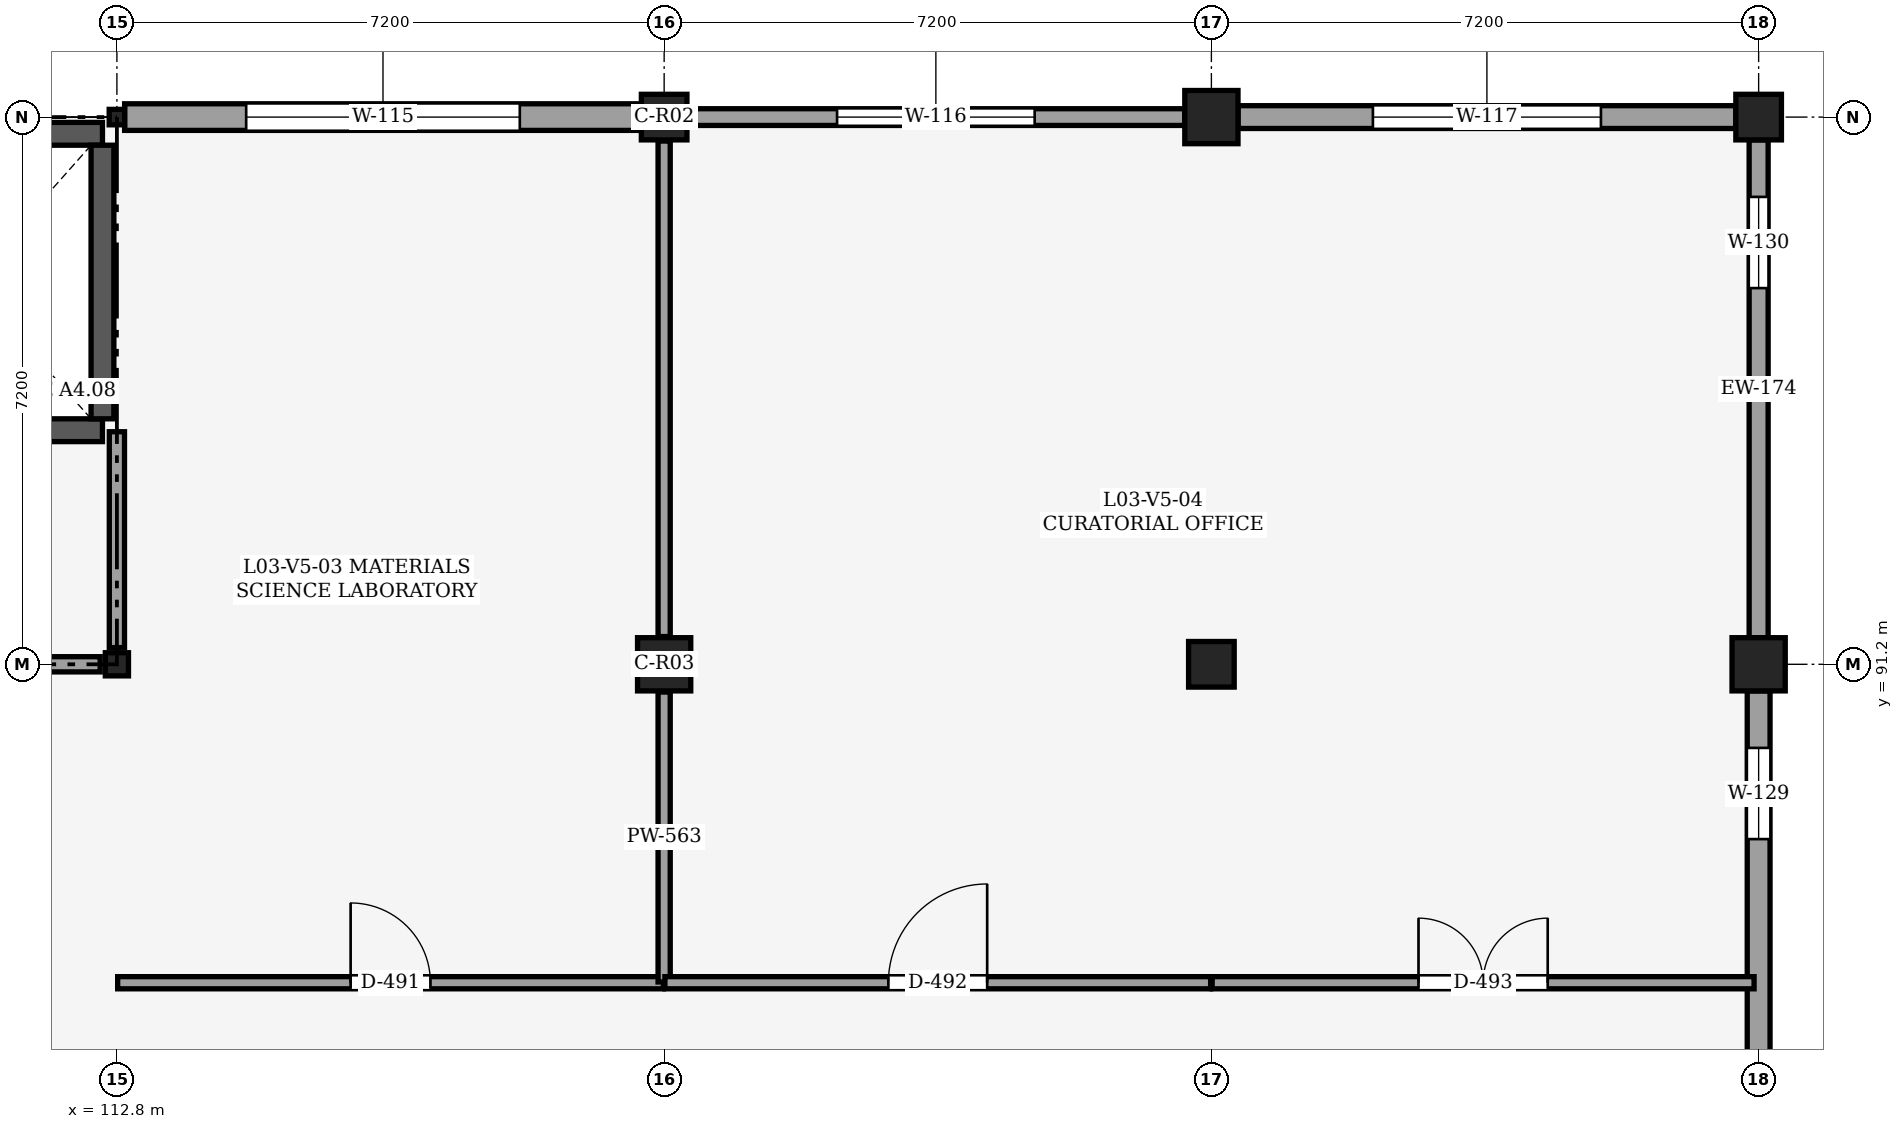
"""IFC4 building model, lengths in metres.
Left out: names, types, materials, properties, quantities, classifications, styles, units other than length and angle.
Written with IfcOpenShell. Run it as: python <this file> out.ifc"""

import sys

from ifc_helpers import new_model, si_unit, direction, frame, frame_2d, origin, origin_2d, place, context, subcontext, project, spatial, rectangle, hollow_rectangle, extrude, element, fill, save


model = new_model("IFC4")
c1 = context("Model", 3, precision=1e-05, world=origin(), true_north=direction((0.0, 1.0)))
c2 = subcontext(c1, "Body", "Model", "MODEL_VIEW")
j1 = project(units=[si_unit("LENGTHUNIT", "METRE"), si_unit("PLANEANGLEUNIT", "RADIAN")], contexts=[c1])
p1 = place(None, origin())
s1 = spatial("IfcSite", under=j1, at=p1, CompositionType="ELEMENT")
p2 = place(p1, origin())
s2 = spatial("IfcBuilding", under=s1, at=p2, CompositionType="ELEMENT")
p3 = place(p2, frame((0.0, 0.0, 15.0)))
s3 = spatial("IfcBuildingStorey", under=s2, at=p3, CompositionType="ELEMENT", Elevation=15.0)
p4 = place(p3, frame((112.8, 91.2, 0.0), z_axis=(0.0, 0.0, 1.0), x_axis=(1.0, 0.0, 0.0)))
e1 = element("IfcColumn", 1, at=p4, inside=s3, PredefinedType="COLUMN", context=c2, shape_type="SweptSolid", body=[
    extrude(hollow_rectangle(XDim=0.305, YDim=0.305, WallThickness=0.016, OuterFilletRadius=0.032, at=origin_2d()), origin(), (0.0, 0.0, 1.0), 4.8),
])
p5 = place(p3, frame((112.8, 98.4, 0.0), z_axis=(0.0, 0.0, 1.0), x_axis=(1.0, 0.0, 0.0)))
e2 = element("IfcColumn", 2, at=p5, inside=s3, PredefinedType="COLUMN", context=c2, shape_type="SweptSolid", body=[
    extrude(hollow_rectangle(XDim=0.203, YDim=0.203, WallThickness=0.013, OuterFilletRadius=0.025, at=origin_2d()), origin(), (0.0, 0.0, 1.0), 4.8),
])
p6 = place(p3, frame((120.0, 91.2, 0.0), z_axis=(0.0, 0.0, 1.0), x_axis=(1.0, 0.0, 0.0)))
e3 = element("IfcColumn", 3, at=p6, inside=s3, PredefinedType="COLUMN", context=c2, shape_type="SweptSolid", body=[
    extrude(rectangle(XDim=0.7, YDim=0.7, at=origin_2d()), origin(), (0.0, 0.0, 1.0), 4.8),
])
for number, where, z_axis, x_axis in (
    (4, (120.0, 98.4, 0.0), (0.0, 0.0, 1.0), (1.0, 0.0, 0.0)),
    (5, (127.2, 91.2, 0.0), (0.0, 0.0, 1.0), (1.0, 0.0, 0.0)),
):
    element("IfcColumn", number, at=place(p3, frame(where, z_axis=z_axis, x_axis=x_axis)), inside=s3, PredefinedType="COLUMN", context=c2, shape_type="SweptSolid", body=[
        extrude(rectangle(XDim=0.6, YDim=0.6, at=origin_2d()), origin(), (0.0, 0.0, 1.0), 4.8),
    ])
for number, where, z_axis, x_axis in (
    (6, (127.2, 98.4, 0.0), (0.0, 0.0, 1.0), (1.0, 0.0, 0.0)),
    (7, (134.4, 91.2, 0.0), (0.0, 0.0, 1.0), (1.0, 0.0, 0.0)),
):
    element("IfcColumn", number, at=place(p3, frame(where, z_axis=z_axis, x_axis=x_axis)), inside=s3, PredefinedType="COLUMN", context=c2, shape_type="SweptSolid", body=[
        extrude(rectangle(XDim=0.7, YDim=0.7, at=origin_2d()), origin(), (0.0, 0.0, 1.0), 4.8),
    ])
p7 = place(p3, frame((134.4, 98.4, 0.0), z_axis=(0.0, 0.0, 1.0), x_axis=(1.0, 0.0, 0.0)))
e8 = element("IfcColumn", 8, at=p7, inside=s3, PredefinedType="COLUMN", context=c2, shape_type="SweptSolid", body=[
    extrude(rectangle(XDim=0.6, YDim=0.6, at=origin_2d()), origin(), (0.0, 0.0, 1.0), 4.8),
])
p8 = place(p3, frame((112.902, 98.4, 0.0), z_axis=(0.0, 0.0, 1.0), x_axis=(1.0, 0.0, 0.0)))
e9 = element("IfcWall", 9, at=p8, inside=s3, PredefinedType="SOLIDWALL", context=c2, shape_type="SweptSolid", body=[
    extrude(rectangle(XDim=6.798, YDim=0.35, at=frame_2d((3.399, 0.0))), origin(), (0.0, 0.0, 1.0), 3.913),
])
p9 = place(p8, frame((1.599, 0.0, 0.9)))
e10 = element("IfcOpeningElement", 10, at=p9, cuts=e9, PredefinedType="OPENING", context=c2, shape_type="SweptSolid", body=[
    extrude(rectangle(XDim=3.6, YDim=1.05, at=frame_2d((1.8, 0.525))), frame((0.0, 0.185, 0.0), z_axis=(0.0, -1.0, 0.0), x_axis=(1.0, 0.0, 0.0)), (0.0, 0.0, 1.0), 0.371),
])
p10 = place(p3, frame((120.3, 98.4, 0.0), z_axis=(0.0, 0.0, 1.0), x_axis=(1.0, 0.0, 0.0)))
e11 = element("IfcWall", 11, at=p10, inside=s3, PredefinedType="SOLIDWALL", context=c2, shape_type="SweptSolid", body=[
    extrude(rectangle(XDim=6.55, YDim=0.22, at=frame_2d((3.275, 0.0))), origin(), (0.0, 0.0, 1.0), 4.164),
])
p11 = place(p10, frame((1.975, 0.0, 0.85)))
e12 = element("IfcOpeningElement", 12, at=p11, cuts=e11, PredefinedType="OPENING", context=c2, shape_type="SweptSolid", body=[
    extrude(rectangle(XDim=2.6, YDim=1.9, at=frame_2d((1.3, 0.95))), frame((0.0, 0.12, 0.0), z_axis=(0.0, -1.0, 0.0), x_axis=(1.0, 0.0, 0.0)), (0.0, 0.0, 1.0), 0.24),
])
p12 = place(p3, frame((127.55, 98.4, 0.0), z_axis=(0.0, 0.0, 1.0), x_axis=(1.0, 0.0, 0.0)))
e13 = element("IfcWall", 13, at=p12, inside=s3, PredefinedType="SOLIDWALL", context=c2, shape_type="SweptSolid", body=[
    extrude(rectangle(XDim=6.55, YDim=0.3, at=frame_2d((3.275, 0.0))), origin(), (0.0, 0.0, 1.0), 3.987),
])
p13 = place(p12, frame((1.775, 0.0, 0.85)))
e14 = element("IfcOpeningElement", 14, at=p13, cuts=e13, PredefinedType="OPENING", context=c2, shape_type="SweptSolid", body=[
    extrude(rectangle(XDim=3.0, YDim=1.9, at=frame_2d((1.5, 0.95))), frame((0.0, 0.16, 0.0), z_axis=(0.0, -1.0, 0.0), x_axis=(1.0, 0.0, 0.0)), (0.0, 0.0, 1.0), 0.321),
])
p14 = place(p3, frame((134.4, 90.85, 0.0), z_axis=(0.0, 0.0, 1.0), x_axis=(0.0, -1.0, 0.0)))
e15 = element("IfcWall", 15, at=p14, inside=s3, PredefinedType="SOLIDWALL", context=c2, shape_type="SweptSolid", body=[
    extrude(rectangle(XDim=6.55, YDim=0.3, at=frame_2d((3.275, 0.0))), origin(), (0.0, 0.0, 1.0), 4.54),
])
p15 = place(p14, frame((0.75, 0.0, 0.9)))
e16 = element("IfcOpeningElement", 16, at=p15, cuts=e15, PredefinedType="OPENING", context=c2, shape_type="SweptSolid", body=[
    extrude(rectangle(XDim=1.2, YDim=1.5, at=frame_2d((0.6, 0.75))), frame((0.0, 0.16, 0.0), z_axis=(0.0, -1.0, 0.0), x_axis=(1.0, 0.0, 0.0)), (0.0, 0.0, 1.0), 0.321),
])
p16 = place(p3, frame((134.4, 98.1, 0.0), z_axis=(0.0, 0.0, 1.0), x_axis=(0.0, -1.0, 0.0)))
e17 = element("IfcWall", 17, at=p16, inside=s3, PredefinedType="SOLIDWALL", context=c2, shape_type="SweptSolid", body=[
    extrude(rectangle(XDim=6.55, YDim=0.25, at=frame_2d((3.275, 0.0))), origin(), (0.0, 0.0, 1.0), 3.987),
])
p17 = place(p16, frame((0.75, 0.0, 0.9)))
e18 = element("IfcOpeningElement", 18, at=p17, cuts=e17, PredefinedType="OPENING", context=c2, shape_type="SweptSolid", body=[
    extrude(rectangle(XDim=1.2, YDim=1.5, at=frame_2d((0.6, 0.75))), frame((0.0, 0.135, 0.0), z_axis=(0.0, -1.0, 0.0), x_axis=(1.0, 0.0, 0.0)), (0.0, 0.0, 1.0), 0.271),
])
p18 = place(p3, frame((104.59, 94.28, 0.0), z_axis=(0.0, 0.0, 1.0), x_axis=(1.0, 0.0, 0.0)))
e19 = element("IfcWall", 19, at=p18, inside=s3, PredefinedType="SHEAR", context=c2, shape_type="SweptSolid", body=[
    extrude(rectangle(XDim=8.02, YDim=0.3, at=frame_2d((4.01, 0.0))), origin(), (0.0, 0.0, 1.0), 4.54),
])
p19 = place(p18, frame((0.45, 0.0, 0.0)))
e20 = element("IfcOpeningElement", 20, at=p19, cuts=e19, PredefinedType="OPENING", context=c2, shape_type="SweptSolid", body=[
    extrude(rectangle(XDim=1.1, YDim=2.15, at=frame_2d((0.55, 1.075))), frame((0.0, 0.16, 0.0), z_axis=(0.0, -1.0, 0.0), x_axis=(1.0, 0.0, 0.0)), (0.0, 0.0, 1.0), 0.321),
])
p20 = place(p3, frame((104.59, 98.18, 0.0), z_axis=(0.0, 0.0, 1.0), x_axis=(1.0, 0.0, 0.0)))
e21 = element("IfcWall", 21, at=p20, inside=s3, PredefinedType="SHEAR", context=c2, shape_type="SweptSolid", body=[
    extrude(rectangle(XDim=8.02, YDim=0.3, at=frame_2d((4.01, 0.0))), origin(), (0.0, 0.0, 1.0), 4.54),
])
p21 = place(p3, frame((112.61, 94.43, 0.0), z_axis=(0.0, 0.0, 1.0), x_axis=(0.0, 1.0, 0.0)))
e22 = element("IfcWall", 22, at=p21, inside=s3, PredefinedType="SHEAR", context=c2, shape_type="SweptSolid", body=[
    extrude(rectangle(XDim=3.6, YDim=0.3, at=frame_2d((1.8, 0.0))), origin(), (0.0, 0.0, 1.0), 4.54),
])
p22 = place(p3, frame((112.8, 91.42, 0.0), z_axis=(0.0, 0.0, 1.0), x_axis=(0.0, 1.0, 0.0)))
e23 = element("IfcWall", 23, at=p22, inside=s3, PredefinedType="PARTITIONING", context=c2, shape_type="SweptSolid", body=[
    extrude(rectangle(XDim=2.84, YDim=0.2, at=frame_2d((1.42, 0.0))), origin(), (0.0, 0.0, 1.0), 4.058),
])
p23 = place(p3, frame((104.62, 91.2, 0.0), z_axis=(0.0, 0.0, 1.0), x_axis=(1.0, 0.0, 0.0)))
e24 = element("IfcWall", 24, at=p23, inside=s3, PredefinedType="PARTITIONING", context=c2, shape_type="SweptSolid", body=[
    extrude(rectangle(XDim=7.96, YDim=0.2, at=frame_2d((3.98, 0.0))), origin(), (0.0, 0.0, 1.0), 3.908),
])
p24 = place(p23, frame((3.255, 0.0, 0.0)))
e25 = element("IfcOpeningElement", 25, at=p24, cuts=e24, PredefinedType="OPENING", context=c2, shape_type="SweptSolid", body=[
    extrude(rectangle(XDim=1.45, YDim=2.2, at=frame_2d((0.725, 1.1))), frame((0.0, 0.11, 0.0), z_axis=(0.0, -1.0, 0.0), x_axis=(1.0, 0.0, 0.0)), (0.0, 0.0, 1.0), 0.22),
])
p25 = place(p3, frame((112.81, 87.01, 0.0), z_axis=(0.0, 0.0, 1.0), x_axis=(1.0, 0.0, 0.0)))
e26 = element("IfcWall", 26, at=p25, inside=s3, PredefinedType="PARTITIONING", context=c2, shape_type="SweptSolid", body=[
    extrude(rectangle(XDim=7.18, YDim=0.16, at=frame_2d((3.59, 0.0))), origin(), (0.0, 0.0, 1.0), 4.52),
])
p26 = place(p25, frame((3.065, 0.0, 0.0)))
e27 = element("IfcOpeningElement", 27, at=p26, cuts=e26, PredefinedType="OPENING", context=c2, shape_type="SweptSolid", body=[
    extrude(rectangle(XDim=1.05, YDim=2.15, at=frame_2d((0.525, 1.075))), frame((0.0, 0.09, 0.0), z_axis=(0.0, -1.0, 0.0), x_axis=(1.0, 0.0, 0.0)), (0.0, 0.0, 1.0), 0.18),
])
p27 = place(p3, frame((120.0, 87.02, 0.0), z_axis=(0.0, 0.0, 1.0), x_axis=(0.0, 1.0, 0.0)))
e28 = element("IfcWall", 28, at=p27, inside=s3, PredefinedType="PARTITIONING", context=c2, shape_type="SweptSolid", body=[
    extrude(rectangle(XDim=3.815, YDim=0.16, at=frame_2d((1.907, 0.0))), origin(), (0.0, 0.0, 1.0), 4.52),
])
p28 = place(p3, frame((120.0, 91.565, 0.0), z_axis=(0.0, 0.0, 1.0), x_axis=(0.0, 1.0, 0.0)))
e29 = element("IfcWall", 29, at=p28, inside=s3, PredefinedType="PARTITIONING", context=c2, shape_type="SweptSolid", body=[
    extrude(rectangle(XDim=6.52, YDim=0.16, at=frame_2d((3.26, 0.0))), origin(), (0.0, 0.0, 1.0), 3.908),
])
p29 = place(p3, frame((120.01, 87.01, 0.0), z_axis=(0.0, 0.0, 1.0), x_axis=(1.0, 0.0, 0.0)))
e30 = element("IfcWall", 30, at=p29, inside=s3, PredefinedType="PARTITIONING", context=c2, shape_type="SweptSolid", body=[
    extrude(rectangle(XDim=7.18, YDim=0.16, at=frame_2d((3.59, 0.0))), origin(), (0.0, 0.0, 1.0), 4.52),
])
p30 = place(p29, frame((2.94, 0.0, 0.0)))
e31 = element("IfcOpeningElement", 31, at=p30, cuts=e30, PredefinedType="OPENING", context=c2, shape_type="SweptSolid", body=[
    extrude(rectangle(XDim=1.3, YDim=2.2, at=frame_2d((0.65, 1.1))), frame((0.0, 0.09, 0.0), z_axis=(0.0, -1.0, 0.0), x_axis=(1.0, 0.0, 0.0)), (0.0, 0.0, 1.0), 0.18),
])
p31 = place(p3, frame((127.21, 87.01, 0.0), z_axis=(0.0, 0.0, 1.0), x_axis=(1.0, 0.0, 0.0)))
e32 = element("IfcWall", 32, at=p31, inside=s3, PredefinedType="PARTITIONING", context=c2, shape_type="SweptSolid", body=[
    extrude(rectangle(XDim=7.13, YDim=0.16, at=frame_2d((3.565, 0.0))), origin(), (0.0, 0.0, 1.0), 4.52),
])
p32 = place(p31, frame((2.715, 0.0, 0.0)))
e33 = element("IfcOpeningElement", 33, at=p32, cuts=e32, PredefinedType="OPENING", context=c2, shape_type="SweptSolid", body=[
    extrude(rectangle(XDim=1.7, YDim=2.4, at=frame_2d((0.85, 1.2))), frame((0.0, 0.09, 0.0), z_axis=(0.0, -1.0, 0.0), x_axis=(1.0, 0.0, 0.0)), (0.0, 0.0, 1.0), 0.18),
])
p33 = place(p9, origin())
e34 = element("IfcWindow", 34, at=p33, inside=s3, PartitioningType="SINGLE_PANEL", PredefinedType="WINDOW", context=c2, shape_type="SweptSolid", body=[
    extrude(rectangle(XDim=3.6, YDim=1.05, at=frame_2d((1.8, 0.525))), frame((0.0, 0.03, 0.0), z_axis=(0.0, -1.0, 0.0), x_axis=(1.0, 0.0, 0.0)), (0.0, 0.0, 1.0), 0.06),
])
fill(e10, e34)
p34 = place(p11, origin())
e35 = element("IfcWindow", 35, at=p34, inside=s3, PartitioningType="SINGLE_PANEL", PredefinedType="WINDOW", context=c2, shape_type="SweptSolid", body=[
    extrude(rectangle(XDim=2.6, YDim=1.9, at=frame_2d((1.3, 0.95))), frame((0.0, 0.03, 0.0), z_axis=(0.0, -1.0, 0.0), x_axis=(1.0, 0.0, 0.0)), (0.0, 0.0, 1.0), 0.06),
])
fill(e12, e35)
p35 = place(p13, origin())
e36 = element("IfcWindow", 36, at=p35, inside=s3, PartitioningType="SINGLE_PANEL", PredefinedType="WINDOW", context=c2, shape_type="SweptSolid", body=[
    extrude(rectangle(XDim=3.0, YDim=1.9, at=frame_2d((1.5, 0.95))), frame((0.0, 0.03, 0.0), z_axis=(0.0, -1.0, 0.0), x_axis=(1.0, 0.0, 0.0)), (0.0, 0.0, 1.0), 0.06),
])
fill(e14, e36)
p36 = place(p15, origin())
e37 = element("IfcWindow", 37, at=p36, inside=s3, PartitioningType="SINGLE_PANEL", PredefinedType="WINDOW", context=c2, shape_type="SweptSolid", body=[
    extrude(rectangle(XDim=1.2, YDim=1.5, at=frame_2d((0.6, 0.75))), frame((0.0, 0.03, 0.0), z_axis=(0.0, -1.0, 0.0), x_axis=(1.0, 0.0, 0.0)), (0.0, 0.0, 1.0), 0.06),
])
fill(e16, e37)
p37 = place(p17, origin())
e38 = element("IfcWindow", 38, at=p37, inside=s3, PartitioningType="SINGLE_PANEL", PredefinedType="WINDOW", context=c2, shape_type="SweptSolid", body=[
    extrude(rectangle(XDim=1.2, YDim=1.5, at=frame_2d((0.6, 0.75))), frame((0.0, 0.03, 0.0), z_axis=(0.0, -1.0, 0.0), x_axis=(1.0, 0.0, 0.0)), (0.0, 0.0, 1.0), 0.06),
])
fill(e18, e38)
p38 = place(p26, origin())
e39 = element("IfcDoor", 39, at=p38, inside=s3, OperationType="SINGLE_SWING_LEFT", PredefinedType="DOOR", context=c2, shape_type="SweptSolid", body=[
    extrude(rectangle(XDim=1.05, YDim=2.15, at=frame_2d((0.525, 1.075))), frame((0.0, 0.025, 0.0), z_axis=(0.0, -1.0, 0.0), x_axis=(1.0, 0.0, 0.0)), (0.0, 0.0, 1.0), 0.05),
])
fill(e27, e39)
p39 = place(p30, origin())
e40 = element("IfcDoor", 40, at=p39, inside=s3, OperationType="SINGLE_SWING_RIGHT", PredefinedType="DOOR", context=c2, shape_type="SweptSolid", body=[
    extrude(rectangle(XDim=1.3, YDim=2.2, at=frame_2d((0.65, 1.1))), frame((0.0, 0.025, 0.0), z_axis=(0.0, -1.0, 0.0), x_axis=(1.0, 0.0, 0.0)), (0.0, 0.0, 1.0), 0.05),
])
fill(e31, e40)
p40 = place(p32, origin())
e41 = element("IfcDoor", 41, at=p40, inside=s3, OperationType="DOUBLE_DOOR_SINGLE_SWING", PredefinedType="DOOR", context=c2, shape_type="SweptSolid", body=[
    extrude(rectangle(XDim=1.7, YDim=2.4, at=frame_2d((0.85, 1.2))), frame((0.0, 0.025, 0.0), z_axis=(0.0, -1.0, 0.0), x_axis=(1.0, 0.0, 0.0)), (0.0, 0.0, 1.0), 0.05),
])
fill(e33, e41)
save(model, sys.argv[1])
